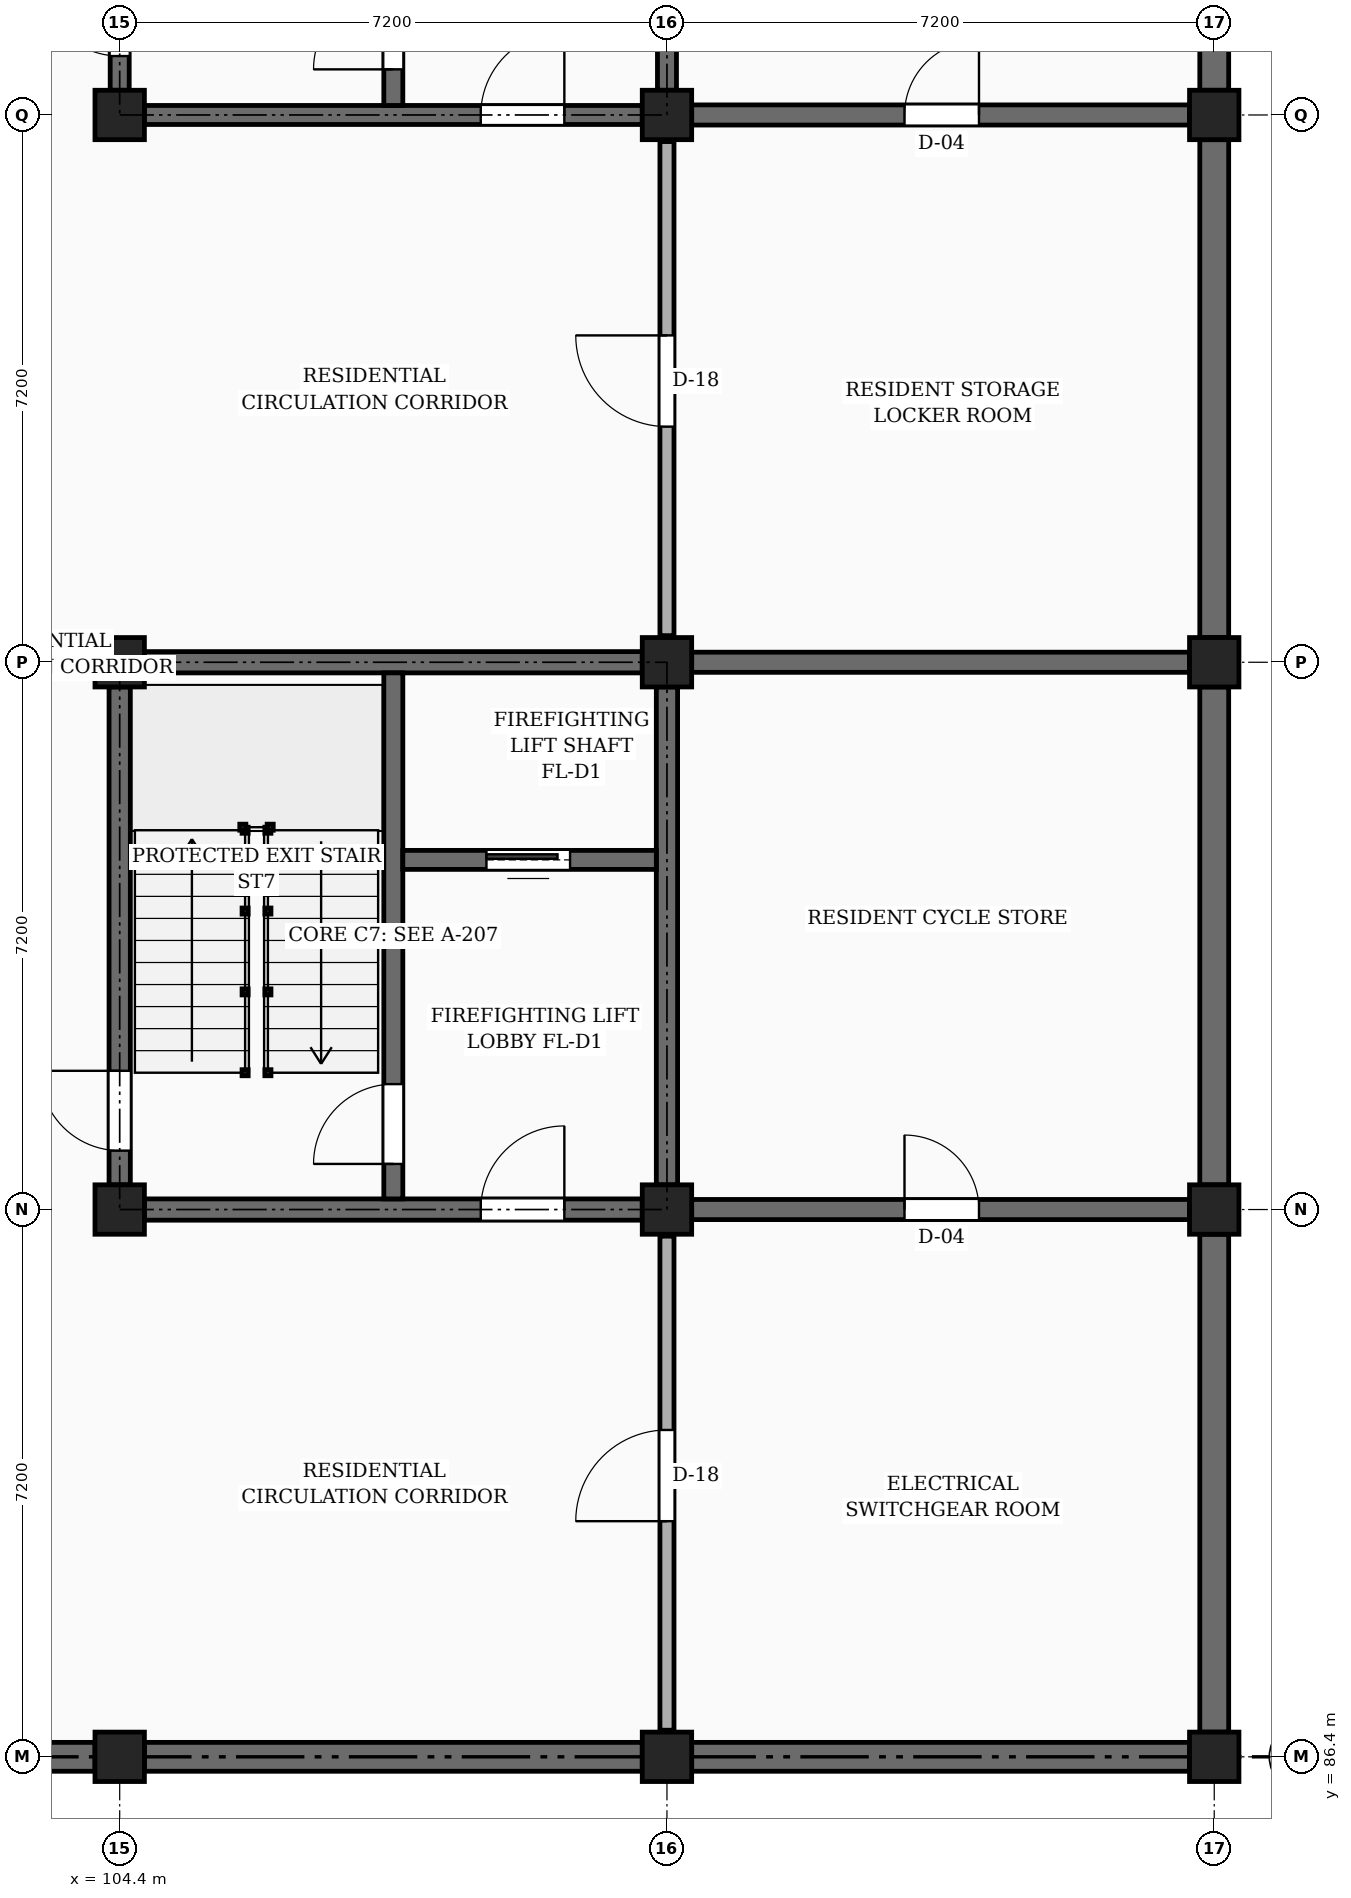
"""IFC4 building model, lengths in metres.
Left out: names, types, materials, properties, quantities, classifications, styles, units other than length and angle.
Written with IfcOpenShell. Run it as: python <this file> out.ifc"""

import sys

from ifc_helpers import new_model, si_unit, direction, frame, frame_2d, origin, origin_2d, place, context, subcontext, project, spatial, rectangle, extrude, element, fill, save


model = new_model("IFC4")
c1 = context("Model", 3, precision=1e-05, world=origin(), true_north=direction((0.0, 1.0)))
c2 = subcontext(c1, "Body", "Model", "MODEL_VIEW")
j1 = project(units=[si_unit("LENGTHUNIT", "METRE"), si_unit("PLANEANGLEUNIT", "RADIAN")], contexts=[c1])
p1 = place(None, origin())
s1 = spatial("IfcSite", under=j1, at=p1, CompositionType="ELEMENT")
p2 = place(p1, origin())
s2 = spatial("IfcBuilding", under=s1, at=p2, CompositionType="ELEMENT")
p3 = place(p2, frame((0.0, 0.0, -4.2)))
s3 = spatial("IfcBuildingStorey", under=s2, at=p3, CompositionType="ELEMENT", Elevation=-4.2)
for number, where, z_axis, x_axis in (
    (1, (104.4, 86.4, 0.0), (0.0, 0.0, 1.0), (1.0, 0.0, 0.0)),
    (2, (104.4, 93.6, 0.0), (0.0, 0.0, 1.0), (1.0, 0.0, 0.0)),
    (3, (104.4, 100.8, 0.0), (0.0, 0.0, 1.0), (1.0, 0.0, 0.0)),
    (4, (104.4, 108.0, 0.0), (0.0, 0.0, 1.0), (1.0, 0.0, 0.0)),
    (5, (111.6, 86.4, 0.0), (0.0, 0.0, 1.0), (1.0, 0.0, 0.0)),
    (6, (111.6, 93.6, 0.0), (0.0, 0.0, 1.0), (1.0, 0.0, 0.0)),
    (7, (111.6, 100.8, 0.0), (0.0, 0.0, 1.0), (1.0, 0.0, 0.0)),
    (8, (111.6, 108.0, 0.0), (0.0, 0.0, 1.0), (1.0, 0.0, 0.0)),
    (9, (118.8, 86.4, 0.0), (0.0, 0.0, 1.0), (1.0, 0.0, 0.0)),
    (10, (118.8, 93.6, 0.0), (0.0, 0.0, 1.0), (1.0, 0.0, 0.0)),
    (11, (118.8, 100.8, 0.0), (0.0, 0.0, 1.0), (1.0, 0.0, 0.0)),
    (12, (118.8, 108.0, 0.0), (0.0, 0.0, 1.0), (1.0, 0.0, 0.0)),
):
    element("IfcColumn", number, at=place(p3, frame(where, z_axis=z_axis, x_axis=x_axis)), inside=s3, PredefinedType="COLUMN", context=c2, shape_type="SweptSolid", body=[
        extrude(rectangle(XDim=0.65, YDim=0.65, at=origin_2d()), origin(), (0.0, 0.0, 1.0), 4.2),
    ])
p4 = place(p3, frame((97.525, 86.4, 0.0), z_axis=(0.0, 0.0, 1.0), x_axis=(1.0, 0.0, 0.0)))
e13 = element("IfcWall", 13, at=p4, inside=s3, PredefinedType="USERDEFINED", context=c2, shape_type="SweptSolid", body=[
    extrude(rectangle(XDim=6.55, YDim=0.38, at=frame_2d((3.275, 0.0))), origin(), (0.0, 0.0, 1.0), 3.03),
])
p5 = place(p3, frame((104.725, 86.4, 0.0), z_axis=(0.0, 0.0, 1.0), x_axis=(1.0, 0.0, 0.0)))
e14 = element("IfcWall", 14, at=p5, inside=s3, PredefinedType="USERDEFINED", context=c2, shape_type="SweptSolid", body=[
    extrude(rectangle(XDim=6.55, YDim=0.38, at=frame_2d((3.275, 0.0))), origin(), (0.0, 0.0, 1.0), 3.03),
])
p6 = place(p3, frame((111.925, 86.4, 0.0), z_axis=(0.0, 0.0, 1.0), x_axis=(1.0, 0.0, 0.0)))
e15 = element("IfcWall", 15, at=p6, inside=s3, PredefinedType="USERDEFINED", context=c2, shape_type="SweptSolid", body=[
    extrude(rectangle(XDim=6.55, YDim=0.38, at=frame_2d((3.275, 0.0))), origin(), (0.0, 0.0, 1.0), 3.03),
])
p7 = place(p3, frame((118.8, 86.725, 0.0), z_axis=(0.0, 0.0, 1.0), x_axis=(0.0, 1.0, 0.0)))
e16 = element("IfcWall", 16, at=p7, inside=s3, PredefinedType="USERDEFINED", context=c2, shape_type="SweptSolid", body=[
    extrude(rectangle(XDim=6.55, YDim=0.38, at=frame_2d((3.275, 0.0))), origin(), (0.0, 0.0, 1.0), 3.03),
])
for number, where, z_axis, x_axis in (
    (17, (118.8, 93.925, 0.0), (0.0, 0.0, 1.0), (0.0, 1.0, 0.0)),
    (18, (118.8, 101.125, 0.0), (0.0, 0.0, 1.0), (0.0, 1.0, 0.0)),
    (19, (118.8, 108.325, 0.0), (0.0, 0.0, 1.0), (0.0, 1.0, 0.0)),
):
    element("IfcWall", number, at=place(p3, frame(where, z_axis=z_axis, x_axis=x_axis)), inside=s3, PredefinedType="USERDEFINED", context=c2, shape_type="SweptSolid", body=[
        extrude(rectangle(XDim=6.55, YDim=0.38, at=frame_2d((3.275, 0.0))), origin(), (0.0, 0.0, 1.0), 3.03),
    ])
p8 = place(p3, frame((111.925, 93.6, 0.0), z_axis=(0.0, 0.0, 1.0), x_axis=(1.0, 0.0, 0.0)))
e20 = element("IfcWall", 20, at=p8, inside=s3, PredefinedType="SOLIDWALL", context=c2, shape_type="SweptSolid", body=[
    extrude(rectangle(XDim=6.55, YDim=0.265, at=frame_2d((3.275, 0.0))), origin(), (0.0, 0.0, 1.0), 3.18),
])
p9 = place(p8, frame((2.8, 0.0, 0.0)))
e21 = element("IfcOpeningElement", 21, at=p9, cuts=e20, PredefinedType="OPENING", context=c2, shape_type="SweptSolid", body=[
    extrude(rectangle(XDim=0.98, YDim=2.12, at=frame_2d((0.49, 1.06))), frame((0.0, 0.143, 0.0), z_axis=(0.0, -1.0, 0.0), x_axis=(1.0, 0.0, 0.0)), (0.0, 0.0, 1.0), 0.285),
])
p10 = place(p3, frame((111.925, 100.8, 0.0), z_axis=(0.0, 0.0, 1.0), x_axis=(1.0, 0.0, 0.0)))
e22 = element("IfcWall", 22, at=p10, inside=s3, PredefinedType="SOLIDWALL", context=c2, shape_type="SweptSolid", body=[
    extrude(rectangle(XDim=6.55, YDim=0.265, at=frame_2d((3.275, 0.0))), origin(), (0.0, 0.0, 1.0), 3.18),
])
p11 = place(p3, frame((111.925, 108.0, 0.0), z_axis=(0.0, 0.0, 1.0), x_axis=(1.0, 0.0, 0.0)))
e23 = element("IfcWall", 23, at=p11, inside=s3, PredefinedType="SOLIDWALL", context=c2, shape_type="SweptSolid", body=[
    extrude(rectangle(XDim=6.55, YDim=0.265, at=frame_2d((3.275, 0.0))), origin(), (0.0, 0.0, 1.0), 3.18),
])
p12 = place(p11, frame((2.8, 0.0, 0.0)))
e24 = element("IfcOpeningElement", 24, at=p12, cuts=e23, PredefinedType="OPENING", context=c2, shape_type="SweptSolid", body=[
    extrude(rectangle(XDim=0.98, YDim=2.12, at=frame_2d((0.49, 1.06))), frame((0.0, 0.143, 0.0), z_axis=(0.0, -1.0, 0.0), x_axis=(1.0, 0.0, 0.0)), (0.0, 0.0, 1.0), 0.285),
])
p13 = place(p3, frame((104.4, 93.925, 0.0), z_axis=(0.0, 0.0, 1.0), x_axis=(0.0, 1.0, 0.0)))
e25 = element("IfcWall", 25, at=p13, inside=s3, PredefinedType="SHEAR", context=c2, shape_type="SweptSolid", body=[
    extrude(rectangle(XDim=6.55, YDim=0.28, at=frame_2d((3.275, 0.0))), origin(), (0.0, 0.0, 1.0), 3.88),
])
p14 = place(p13, frame((0.45, 0.0, 0.0)))
e26 = element("IfcOpeningElement", 26, at=p14, cuts=e25, PredefinedType="OPENING", context=c2, shape_type="SweptSolid", body=[
    extrude(rectangle(XDim=1.05, YDim=2.15, at=frame_2d((0.525, 1.075))), frame((0.0, 0.15, 0.0), z_axis=(0.0, -1.0, 0.0), x_axis=(1.0, 0.0, 0.0)), (0.0, 0.0, 1.0), 0.3),
])
p15 = place(p3, frame((104.725, 100.8, 0.0), z_axis=(0.0, 0.0, 1.0), x_axis=(1.0, 0.0, 0.0)))
e27 = element("IfcWall", 27, at=p15, inside=s3, PredefinedType="SHEAR", context=c2, shape_type="SweptSolid", body=[
    extrude(rectangle(XDim=6.55, YDim=0.28, at=frame_2d((3.275, 0.0))), origin(), (0.0, 0.0, 1.0), 3.88),
])
p16 = place(p3, frame((111.6, 93.925, 0.0), z_axis=(0.0, 0.0, 1.0), x_axis=(0.0, 1.0, 0.0)))
e28 = element("IfcWall", 28, at=p16, inside=s3, PredefinedType="SHEAR", context=c2, shape_type="SweptSolid", body=[
    extrude(rectangle(XDim=6.55, YDim=0.28, at=frame_2d((3.275, 0.0))), origin(), (0.0, 0.0, 1.0), 3.88),
])
p17 = place(p3, frame((104.725, 93.6, 0.0), z_axis=(0.0, 0.0, 1.0), x_axis=(1.0, 0.0, 0.0)))
e29 = element("IfcWall", 29, at=p17, inside=s3, PredefinedType="SHEAR", context=c2, shape_type="SweptSolid", body=[
    extrude(rectangle(XDim=6.55, YDim=0.28, at=frame_2d((3.275, 0.0))), origin(), (0.0, 0.0, 1.0), 3.88),
])
p18 = place(p17, frame((4.425, 0.0, 0.0)))
e30 = element("IfcOpeningElement", 30, at=p18, cuts=e29, PredefinedType="OPENING", context=c2, shape_type="SweptSolid", body=[
    extrude(rectangle(XDim=1.1, YDim=2.15, at=frame_2d((0.55, 1.075))), frame((0.0, 0.15, 0.0), z_axis=(0.0, -1.0, 0.0), x_axis=(1.0, 0.0, 0.0)), (0.0, 0.0, 1.0), 0.3),
])
p19 = place(p3, frame((108.0, 93.74, 0.0), z_axis=(0.0, 0.0, 1.0), x_axis=(0.0, 1.0, 0.0)))
e31 = element("IfcWall", 31, at=p19, inside=s3, PredefinedType="SHEAR", context=c2, shape_type="SweptSolid", body=[
    extrude(rectangle(XDim=6.92, YDim=0.25, at=frame_2d((3.46, 0.0))), origin(), (0.0, 0.0, 1.0), 3.88),
])
p20 = place(p19, frame((0.46, 0.0, 0.0)))
e32 = element("IfcOpeningElement", 32, at=p20, cuts=e31, PredefinedType="OPENING", context=c2, shape_type="SweptSolid", body=[
    extrude(rectangle(XDim=1.05, YDim=2.15, at=frame_2d((0.525, 1.075))), frame((0.0, 0.135, 0.0), z_axis=(0.0, -1.0, 0.0), x_axis=(1.0, 0.0, 0.0)), (0.0, 0.0, 1.0), 0.27),
])
p21 = place(p3, frame((108.125, 98.2, 0.0), z_axis=(0.0, 0.0, 1.0), x_axis=(1.0, 0.0, 0.0)))
e33 = element("IfcWall", 33, at=p21, inside=s3, PredefinedType="SHEAR", context=c2, shape_type="SweptSolid", body=[
    extrude(rectangle(XDim=3.335, YDim=0.25, at=frame_2d((1.667, 0.0))), origin(), (0.0, 0.0, 1.0), 3.88),
])
p22 = place(p21, frame((1.1, 0.0, 0.0)))
e34 = element("IfcOpeningElement", 34, at=p22, cuts=e33, PredefinedType="OPENING", context=c2, shape_type="SweptSolid", body=[
    extrude(rectangle(XDim=1.1, YDim=2.2, at=frame_2d((0.55, 1.1))), frame((0.0, 0.135, 0.0), z_axis=(0.0, -1.0, 0.0), x_axis=(1.0, 0.0, 0.0)), (0.0, 0.0, 1.0), 0.27),
])
p23 = place(p3, frame((104.4, 108.325, 0.0), z_axis=(0.0, 0.0, 1.0), x_axis=(0.0, 1.0, 0.0)))
e35 = element("IfcWall", 35, at=p23, inside=s3, PredefinedType="SHEAR", context=c2, shape_type="SweptSolid", body=[
    extrude(rectangle(XDim=6.55, YDim=0.25, at=frame_2d((3.275, 0.0))), origin(), (0.0, 0.0, 1.0), 3.88),
])
p24 = place(p23, frame((0.45, 0.0, 0.0)))
e36 = element("IfcOpeningElement", 36, at=p24, cuts=e35, PredefinedType="OPENING", context=c2, shape_type="SweptSolid", body=[
    extrude(rectangle(XDim=1.05, YDim=2.15, at=frame_2d((0.525, 1.075))), frame((0.0, 0.135, 0.0), z_axis=(0.0, -1.0, 0.0), x_axis=(1.0, 0.0, 0.0)), (0.0, 0.0, 1.0), 0.27),
])
p25 = place(p3, frame((111.6, 108.325, 0.0), z_axis=(0.0, 0.0, 1.0), x_axis=(0.0, 1.0, 0.0)))
e37 = element("IfcWall", 37, at=p25, inside=s3, PredefinedType="SHEAR", context=c2, shape_type="SweptSolid", body=[
    extrude(rectangle(XDim=6.55, YDim=0.25, at=frame_2d((3.275, 0.0))), origin(), (0.0, 0.0, 1.0), 3.88),
])
p26 = place(p3, frame((104.725, 108.0, 0.0), z_axis=(0.0, 0.0, 1.0), x_axis=(1.0, 0.0, 0.0)))
e38 = element("IfcWall", 38, at=p26, inside=s3, PredefinedType="SHEAR", context=c2, shape_type="SweptSolid", body=[
    extrude(rectangle(XDim=6.55, YDim=0.25, at=frame_2d((3.275, 0.0))), origin(), (0.0, 0.0, 1.0), 3.88),
])
p27 = place(p26, frame((4.425, 0.0, 0.0)))
e39 = element("IfcOpeningElement", 39, at=p27, cuts=e38, PredefinedType="OPENING", context=c2, shape_type="SweptSolid", body=[
    extrude(rectangle(XDim=1.1, YDim=2.15, at=frame_2d((0.55, 1.075))), frame((0.0, 0.135, 0.0), z_axis=(0.0, -1.0, 0.0), x_axis=(1.0, 0.0, 0.0)), (0.0, 0.0, 1.0), 0.27),
])
p28 = place(p3, frame((108.0, 108.125, 0.0), z_axis=(0.0, 0.0, 1.0), x_axis=(0.0, 1.0, 0.0)))
e40 = element("IfcWall", 40, at=p28, inside=s3, PredefinedType="SHEAR", context=c2, shape_type="SweptSolid", body=[
    extrude(rectangle(XDim=6.95, YDim=0.25, at=frame_2d((3.475, 0.0))), origin(), (0.0, 0.0, 1.0), 3.88),
])
p29 = place(p28, frame((0.475, 0.0, 0.0)))
e41 = element("IfcOpeningElement", 41, at=p29, cuts=e40, PredefinedType="OPENING", context=c2, shape_type="SweptSolid", body=[
    extrude(rectangle(XDim=1.05, YDim=2.15, at=frame_2d((0.525, 1.075))), frame((0.0, 0.135, 0.0), z_axis=(0.0, -1.0, 0.0), x_axis=(1.0, 0.0, 0.0)), (0.0, 0.0, 1.0), 0.27),
])
p30 = place(p3, frame((111.6, 86.75, 0.0), z_axis=(0.0, 0.0, 1.0), x_axis=(0.0, 1.0, 0.0)))
e42 = element("IfcWall", 42, at=p30, inside=s3, PredefinedType="PARTITIONING", context=c2, shape_type="SweptSolid", body=[
    extrude(rectangle(XDim=6.5, YDim=0.185, at=frame_2d((3.25, 0.0))), origin(), (0.0, 0.0, 1.0), 3.08),
])
p31 = place(p30, frame((2.75, 0.0, 0.0)))
e43 = element("IfcOpeningElement", 43, at=p31, cuts=e42, PredefinedType="OPENING", context=c2, shape_type="SweptSolid", body=[
    extrude(rectangle(XDim=1.2, YDim=2.2, at=frame_2d((0.6, 1.1))), frame((0.0, 0.103, 0.0), z_axis=(0.0, -1.0, 0.0), x_axis=(1.0, 0.0, 0.0)), (0.0, 0.0, 1.0), 0.205),
])
p32 = place(p3, frame((111.6, 101.15, 0.0), z_axis=(0.0, 0.0, 1.0), x_axis=(0.0, 1.0, 0.0)))
e44 = element("IfcWall", 44, at=p32, inside=s3, PredefinedType="PARTITIONING", context=c2, shape_type="SweptSolid", body=[
    extrude(rectangle(XDim=6.5, YDim=0.185, at=frame_2d((3.25, 0.0))), origin(), (0.0, 0.0, 1.0), 3.08),
])
p33 = place(p32, frame((2.75, 0.0, 0.0)))
e45 = element("IfcOpeningElement", 45, at=p33, cuts=e44, PredefinedType="OPENING", context=c2, shape_type="SweptSolid", body=[
    extrude(rectangle(XDim=1.2, YDim=2.2, at=frame_2d((0.6, 1.1))), frame((0.0, 0.103, 0.0), z_axis=(0.0, -1.0, 0.0), x_axis=(1.0, 0.0, 0.0)), (0.0, 0.0, 1.0), 0.205),
])
p34 = place(p14, origin())
e46 = element("IfcDoor", 46, at=p34, inside=s3, OperationType="SINGLE_SWING_RIGHT", PredefinedType="DOOR", context=c2, shape_type="SweptSolid", body=[
    extrude(rectangle(XDim=1.05, YDim=2.15, at=frame_2d((0.525, 1.075))), frame((0.0, 0.025, 0.0), z_axis=(0.0, -1.0, 0.0), x_axis=(1.0, 0.0, 0.0)), (0.0, 0.0, 1.0), 0.05),
])
fill(e26, e46)
p35 = place(p18, frame((1.1, 0.0, 0.0), z_axis=(0.0, 0.0, 1.0), x_axis=(-1.0, 0.0, 0.0)))
e47 = element("IfcDoor", 47, at=p35, inside=s3, OperationType="SINGLE_SWING_RIGHT", PredefinedType="DOOR", context=c2, shape_type="SweptSolid", body=[
    extrude(rectangle(XDim=1.1, YDim=2.15, at=frame_2d((0.55, 1.075))), frame((0.0, 0.025, 0.0), z_axis=(0.0, -1.0, 0.0), x_axis=(1.0, 0.0, 0.0)), (0.0, 0.0, 1.0), 0.05),
])
fill(e30, e47)
p36 = place(p20, origin())
e48 = element("IfcDoor", 48, at=p36, inside=s3, OperationType="SINGLE_SWING_LEFT", PredefinedType="DOOR", context=c2, shape_type="SweptSolid", body=[
    extrude(rectangle(XDim=1.05, YDim=2.15, at=frame_2d((0.525, 1.075))), frame((0.0, 0.025, 0.0), z_axis=(0.0, -1.0, 0.0), x_axis=(1.0, 0.0, 0.0)), (0.0, 0.0, 1.0), 0.05),
])
fill(e32, e48)
p37 = place(p22, origin())
e49 = element("IfcDoor", 49, at=p37, inside=s3, OperationType="SLIDING_TO_LEFT", PredefinedType="DOOR", context=c2, shape_type="SweptSolid", body=[
    extrude(rectangle(XDim=1.1, YDim=2.2, at=frame_2d((0.55, 1.1))), frame((0.0, 0.025, 0.0), z_axis=(0.0, -1.0, 0.0), x_axis=(1.0, 0.0, 0.0)), (0.0, 0.0, 1.0), 0.05),
])
fill(e34, e49)
p38 = place(p24, origin())
e50 = element("IfcDoor", 50, at=p38, inside=s3, OperationType="SINGLE_SWING_RIGHT", PredefinedType="DOOR", context=c2, shape_type="SweptSolid", body=[
    extrude(rectangle(XDim=1.05, YDim=2.15, at=frame_2d((0.525, 1.075))), frame((0.0, 0.025, 0.0), z_axis=(0.0, -1.0, 0.0), x_axis=(1.0, 0.0, 0.0)), (0.0, 0.0, 1.0), 0.05),
])
fill(e36, e50)
p39 = place(p27, frame((1.1, 0.0, 0.0), z_axis=(0.0, 0.0, 1.0), x_axis=(-1.0, 0.0, 0.0)))
e51 = element("IfcDoor", 51, at=p39, inside=s3, OperationType="SINGLE_SWING_RIGHT", PredefinedType="DOOR", context=c2, shape_type="SweptSolid", body=[
    extrude(rectangle(XDim=1.1, YDim=2.15, at=frame_2d((0.55, 1.075))), frame((0.0, 0.025, 0.0), z_axis=(0.0, -1.0, 0.0), x_axis=(1.0, 0.0, 0.0)), (0.0, 0.0, 1.0), 0.05),
])
fill(e39, e51)
p40 = place(p29, origin())
e52 = element("IfcDoor", 52, at=p40, inside=s3, OperationType="SINGLE_SWING_LEFT", PredefinedType="DOOR", context=c2, shape_type="SweptSolid", body=[
    extrude(rectangle(XDim=1.05, YDim=2.15, at=frame_2d((0.525, 1.075))), frame((0.0, 0.025, 0.0), z_axis=(0.0, -1.0, 0.0), x_axis=(1.0, 0.0, 0.0)), (0.0, 0.0, 1.0), 0.05),
])
fill(e41, e52)
p41 = place(p31, origin())
e53 = element("IfcDoor", 53, at=p41, inside=s3, OperationType="SINGLE_SWING_LEFT", PredefinedType="DOOR", context=c2, shape_type="SweptSolid", body=[
    extrude(rectangle(XDim=1.2, YDim=2.2, at=frame_2d((0.6, 1.1))), frame((0.0, 0.025, 0.0), z_axis=(0.0, -1.0, 0.0), x_axis=(1.0, 0.0, 0.0)), (0.0, 0.0, 1.0), 0.05),
])
fill(e43, e53)
p42 = place(p33, origin())
e54 = element("IfcDoor", 54, at=p42, inside=s3, OperationType="SINGLE_SWING_RIGHT", PredefinedType="DOOR", context=c2, shape_type="SweptSolid", body=[
    extrude(rectangle(XDim=1.2, YDim=2.2, at=frame_2d((0.6, 1.1))), frame((0.0, 0.025, 0.0), z_axis=(0.0, -1.0, 0.0), x_axis=(1.0, 0.0, 0.0)), (0.0, 0.0, 1.0), 0.05),
])
fill(e45, e54)
p43 = place(p9, origin())
e55 = element("IfcDoor", 55, at=p43, inside=s3, OperationType="SINGLE_SWING_LEFT", PredefinedType="DOOR", context=c2, shape_type="SweptSolid", body=[
    extrude(rectangle(XDim=0.98, YDim=2.12, at=frame_2d((0.49, 1.06))), frame((0.0, 0.025, 0.0), z_axis=(0.0, -1.0, 0.0), x_axis=(1.0, 0.0, 0.0)), (0.0, 0.0, 1.0), 0.05),
])
fill(e21, e55)
p44 = place(p12, origin())
e56 = element("IfcDoor", 56, at=p44, inside=s3, OperationType="SINGLE_SWING_RIGHT", PredefinedType="DOOR", context=c2, shape_type="SweptSolid", body=[
    extrude(rectangle(XDim=0.98, YDim=2.12, at=frame_2d((0.49, 1.06))), frame((0.0, 0.025, 0.0), z_axis=(0.0, -1.0, 0.0), x_axis=(1.0, 0.0, 0.0)), (0.0, 0.0, 1.0), 0.05),
])
fill(e24, e56)
save(model, sys.argv[1])
